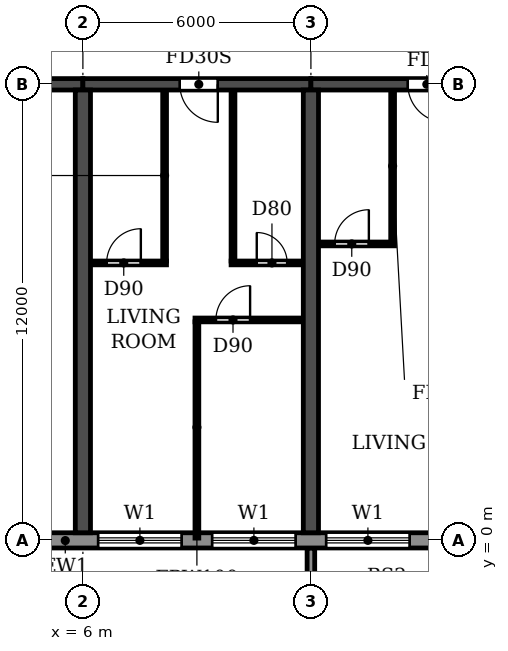
"""IFC4 building model, lengths in metres.
Left out: names, types, materials, properties, quantities, classifications, styles, units other than length and angle.
Written with IfcOpenShell. Run it as: python <this file> out.ifc"""

import sys

from ifc_helpers import new_model, si_unit, direction, frame, frame_2d, origin, place, context, subcontext, project, spatial, polyline, rectangle, outline, extrude, source, transform, mapped, element, fill, save


model = new_model("IFC4")
c1 = context("Model", 3, precision=1e-05, world=origin(), true_north=direction((0.0, 1.0)))
c2 = subcontext(c1, "Body", "Model", "MODEL_VIEW")
j1 = project(units=[si_unit("LENGTHUNIT", "METRE"), si_unit("PLANEANGLEUNIT", "RADIAN")], contexts=[c1])
p1 = place(None, origin())
s1 = spatial("IfcSite", under=j1, at=p1, CompositionType="ELEMENT")
p2 = place(p1, origin())
s2 = spatial("IfcBuilding", under=s1, at=p2, CompositionType="ELEMENT")
p3 = place(p2, frame((0.0, 0.0, 43.2)))
s3 = spatial("IfcBuildingStorey", under=s2, at=p3, CompositionType="ELEMENT", Elevation=43.2)
for number, where, z_axis, x_axis in (
    (1, (6.0, 0.2, 0.0), (0.0, 0.0, 1.0), (0.0, 1.0, 0.0)),
    (2, (12.0, 0.2, 0.0), (0.0, 0.0, 1.0), (0.0, 1.0, 0.0)),
):
    element("IfcWall", number, at=place(p3, frame(where, z_axis=z_axis, x_axis=x_axis)), inside=s3, PredefinedType="SHEAR", context=c2, shape_type="SweptSolid", body=[
        extrude(rectangle(XDim=11.65, YDim=0.4, at=frame_2d((5.825, 0.0))), origin(), (0.0, 0.0, 1.0), 3.05),
    ])
p4 = place(p3, frame((0.2, 12.0, 0.0), z_axis=(0.0, 0.0, 1.0), x_axis=(1.0, 0.0, 0.0)))
e3 = element("IfcWall", 3, at=p4, inside=s3, PredefinedType="SHEAR", context=c2, shape_type="SweptSolid", body=[
    extrude(rectangle(XDim=5.8, YDim=0.3, at=frame_2d((2.9, 0.0))), origin(), (0.0, 0.0, 1.0), 2.45),
])
p5 = place(p4, frame((2.3, 0.0, 0.0)))
e4 = element("IfcOpeningElement", 4, at=p5, cuts=e3, PredefinedType="OPENING", context=c2, shape_type="SweptSolid", body=[
    extrude(rectangle(XDim=1.0, YDim=2.1, at=frame_2d((0.5, 1.05))), frame((0.0, 0.16, 0.0), z_axis=(0.0, -1.0, 0.0), x_axis=(1.0, 0.0, 0.0)), (0.0, 0.0, 1.0), 0.32),
])
p6 = place(p3, frame((6.0, 12.0, 0.0), z_axis=(0.0, 0.0, 1.0), x_axis=(1.0, 0.0, 0.0)))
e5 = element("IfcWall", 5, at=p6, inside=s3, PredefinedType="SHEAR", context=c2, shape_type="SweptSolid", body=[
    extrude(rectangle(XDim=6.0, YDim=0.3, at=frame_2d((3.0, 0.0))), origin(), (0.0, 0.0, 1.0), 2.45),
])
p7 = place(p6, frame((2.55, 0.0, 0.0)))
e6 = element("IfcOpeningElement", 6, at=p7, cuts=e5, PredefinedType="OPENING", context=c2, shape_type="SweptSolid", body=[
    extrude(rectangle(XDim=1.0, YDim=2.1, at=frame_2d((0.5, 1.05))), frame((0.0, 0.16, 0.0), z_axis=(0.0, -1.0, 0.0), x_axis=(1.0, 0.0, 0.0)), (0.0, 0.0, 1.0), 0.32),
])
p8 = place(p3, frame((12.0, 12.0, 0.0), z_axis=(0.0, 0.0, 1.0), x_axis=(1.0, 0.0, 0.0)))
e7 = element("IfcWall", 7, at=p8, inside=s3, PredefinedType="SHEAR", context=c2, shape_type="SweptSolid", body=[
    extrude(rectangle(XDim=6.0, YDim=0.3, at=frame_2d((3.0, 0.0))), origin(), (0.0, 0.0, 1.0), 2.45),
])
p9 = place(p8, frame((2.55, 0.0, 0.0)))
e8 = element("IfcOpeningElement", 8, at=p9, cuts=e7, PredefinedType="OPENING", context=c2, shape_type="SweptSolid", body=[
    extrude(rectangle(XDim=1.0, YDim=2.1, at=frame_2d((0.5, 1.05))), frame((0.0, 0.16, 0.0), z_axis=(0.0, -1.0, 0.0), x_axis=(1.0, 0.0, 0.0)), (0.0, 0.0, 1.0), 0.32),
])
p10 = place(p3, frame((4.683, 0.0, 0.0), z_axis=(0.0, 0.0, 1.0), x_axis=(1.0, 0.0, 0.0)))
e9 = element("IfcWall", 9, at=p10, inside=s3, PredefinedType="STANDARD", context=c2, shape_type="SweptSolid", body=[
    extrude(rectangle(XDim=92.634, YDim=0.4, at=frame_2d((46.317, 0.0))), origin(), (0.0, 0.0, 1.0), 3.05),
])
p11 = place(p10, frame((1.717, 0.0, 0.9)))
e10 = element("IfcOpeningElement", 10, at=p11, cuts=e9, PredefinedType="OPENING", context=c2, shape_type="SweptSolid", body=[
    extrude(rectangle(XDim=2.2, YDim=1.5, at=frame_2d((1.1, 0.75))), frame((0.0, 0.21, 0.0), z_axis=(0.0, -1.0, 0.0), x_axis=(1.0, 0.0, 0.0)), (0.0, 0.0, 1.0), 0.42),
])
p12 = place(p10, frame((4.717, 0.0, 0.9)))
e11 = element("IfcOpeningElement", 11, at=p12, cuts=e9, PredefinedType="OPENING", context=c2, shape_type="SweptSolid", body=[
    extrude(rectangle(XDim=2.2, YDim=1.5, at=frame_2d((1.1, 0.75))), frame((0.0, 0.21, 0.0), z_axis=(0.0, -1.0, 0.0), x_axis=(1.0, 0.0, 0.0)), (0.0, 0.0, 1.0), 0.42),
])
p13 = place(p10, frame((7.717, 0.0, 0.9)))
e12 = element("IfcOpeningElement", 12, at=p13, cuts=e9, PredefinedType="OPENING", context=c2, shape_type="SweptSolid", body=[
    extrude(rectangle(XDim=2.2, YDim=1.5, at=frame_2d((1.1, 0.75))), frame((0.0, 0.21, 0.0), z_axis=(0.0, -1.0, 0.0), x_axis=(1.0, 0.0, 0.0)), (0.0, 0.0, 1.0), 0.42),
])
p14 = place(p10, frame((10.917, 0.0, 0.0)))
e13 = element("IfcOpeningElement", 13, at=p14, cuts=e9, PredefinedType="OPENING", context=c2, shape_type="SweptSolid", body=[
    extrude(rectangle(XDim=1.8, YDim=2.4, at=frame_2d((0.9, 1.2))), frame((0.0, 0.21, 0.0), z_axis=(0.0, -1.0, 0.0), x_axis=(1.0, 0.0, 0.0)), (0.0, 0.0, 1.0), 0.42),
])
p15 = place(p10, frame((13.717, 0.0, 0.9)))
e14 = element("IfcOpeningElement", 14, at=p15, cuts=e9, PredefinedType="OPENING", context=c2, shape_type="SweptSolid", body=[
    extrude(rectangle(XDim=2.2, YDim=1.5, at=frame_2d((1.1, 0.75))), frame((0.0, 0.21, 0.0), z_axis=(0.0, -1.0, 0.0), x_axis=(1.0, 0.0, 0.0)), (0.0, 0.0, 1.0), 0.42),
])
p16 = place(p10, frame((16.717, 0.0, 0.9)))
e15 = element("IfcOpeningElement", 15, at=p16, cuts=e9, PredefinedType="OPENING", context=c2, shape_type="SweptSolid", body=[
    extrude(rectangle(XDim=2.2, YDim=1.5, at=frame_2d((1.1, 0.75))), frame((0.0, 0.21, 0.0), z_axis=(0.0, -1.0, 0.0), x_axis=(1.0, 0.0, 0.0)), (0.0, 0.0, 1.0), 0.42),
])
p17 = place(p10, frame((19.917, 0.0, 0.0)))
e16 = element("IfcOpeningElement", 16, at=p17, cuts=e9, PredefinedType="OPENING", context=c2, shape_type="SweptSolid", body=[
    extrude(rectangle(XDim=1.8, YDim=2.4, at=frame_2d((0.9, 1.2))), frame((0.0, 0.21, 0.0), z_axis=(0.0, -1.0, 0.0), x_axis=(1.0, 0.0, 0.0)), (0.0, 0.0, 1.0), 0.42),
])
p18 = place(p10, frame((22.717, 0.0, 0.9)))
e17 = element("IfcOpeningElement", 17, at=p18, cuts=e9, PredefinedType="OPENING", context=c2, shape_type="SweptSolid", body=[
    extrude(rectangle(XDim=2.2, YDim=1.5, at=frame_2d((1.1, 0.75))), frame((0.0, 0.21, 0.0), z_axis=(0.0, -1.0, 0.0), x_axis=(1.0, 0.0, 0.0)), (0.0, 0.0, 1.0), 0.42),
])
p19 = place(p10, frame((25.717, 0.0, 0.9)))
e18 = element("IfcOpeningElement", 18, at=p19, cuts=e9, PredefinedType="OPENING", context=c2, shape_type="SweptSolid", body=[
    extrude(rectangle(XDim=2.2, YDim=1.5, at=frame_2d((1.1, 0.75))), frame((0.0, 0.21, 0.0), z_axis=(0.0, -1.0, 0.0), x_axis=(1.0, 0.0, 0.0)), (0.0, 0.0, 1.0), 0.42),
])
p20 = place(p10, frame((28.717, 0.0, 0.9)))
e19 = element("IfcOpeningElement", 19, at=p20, cuts=e9, PredefinedType="OPENING", context=c2, shape_type="SweptSolid", body=[
    extrude(rectangle(XDim=2.2, YDim=1.5, at=frame_2d((1.1, 0.75))), frame((0.0, 0.21, 0.0), z_axis=(0.0, -1.0, 0.0), x_axis=(1.0, 0.0, 0.0)), (0.0, 0.0, 1.0), 0.42),
])
p21 = place(p10, frame((31.717, 0.0, 0.9)))
e20 = element("IfcOpeningElement", 20, at=p21, cuts=e9, PredefinedType="OPENING", context=c2, shape_type="SweptSolid", body=[
    extrude(rectangle(XDim=2.2, YDim=1.5, at=frame_2d((1.1, 0.75))), frame((0.0, 0.21, 0.0), z_axis=(0.0, -1.0, 0.0), x_axis=(1.0, 0.0, 0.0)), (0.0, 0.0, 1.0), 0.42),
])
p22 = place(p10, frame((34.917, 0.0, 0.0)))
e21 = element("IfcOpeningElement", 21, at=p22, cuts=e9, PredefinedType="OPENING", context=c2, shape_type="SweptSolid", body=[
    extrude(rectangle(XDim=1.8, YDim=2.4, at=frame_2d((0.9, 1.2))), frame((0.0, 0.21, 0.0), z_axis=(0.0, -1.0, 0.0), x_axis=(1.0, 0.0, 0.0)), (0.0, 0.0, 1.0), 0.42),
])
p23 = place(p10, frame((37.717, 0.0, 0.9)))
e22 = element("IfcOpeningElement", 22, at=p23, cuts=e9, PredefinedType="OPENING", context=c2, shape_type="SweptSolid", body=[
    extrude(rectangle(XDim=2.2, YDim=1.5, at=frame_2d((1.1, 0.75))), frame((0.0, 0.21, 0.0), z_axis=(0.0, -1.0, 0.0), x_axis=(1.0, 0.0, 0.0)), (0.0, 0.0, 1.0), 0.42),
])
p24 = place(p10, frame((40.717, 0.0, 0.9)))
e23 = element("IfcOpeningElement", 23, at=p24, cuts=e9, PredefinedType="OPENING", context=c2, shape_type="SweptSolid", body=[
    extrude(rectangle(XDim=2.2, YDim=1.5, at=frame_2d((1.1, 0.75))), frame((0.0, 0.21, 0.0), z_axis=(0.0, -1.0, 0.0), x_axis=(1.0, 0.0, 0.0)), (0.0, 0.0, 1.0), 0.42),
])
p25 = place(p10, frame((43.717, 0.0, 0.9)))
e24 = element("IfcOpeningElement", 24, at=p25, cuts=e9, PredefinedType="OPENING", context=c2, shape_type="SweptSolid", body=[
    extrude(rectangle(XDim=2.2, YDim=1.5, at=frame_2d((1.1, 0.75))), frame((0.0, 0.21, 0.0), z_axis=(0.0, -1.0, 0.0), x_axis=(1.0, 0.0, 0.0)), (0.0, 0.0, 1.0), 0.42),
])
p26 = place(p10, frame((46.917, 0.0, 0.0)))
e25 = element("IfcOpeningElement", 25, at=p26, cuts=e9, PredefinedType="OPENING", context=c2, shape_type="SweptSolid", body=[
    extrude(rectangle(XDim=1.8, YDim=2.4, at=frame_2d((0.9, 1.2))), frame((0.0, 0.21, 0.0), z_axis=(0.0, -1.0, 0.0), x_axis=(1.0, 0.0, 0.0)), (0.0, 0.0, 1.0), 0.42),
])
p27 = place(p10, frame((49.717, 0.0, 0.9)))
e26 = element("IfcOpeningElement", 26, at=p27, cuts=e9, PredefinedType="OPENING", context=c2, shape_type="SweptSolid", body=[
    extrude(rectangle(XDim=2.2, YDim=1.5, at=frame_2d((1.1, 0.75))), frame((0.0, 0.21, 0.0), z_axis=(0.0, -1.0, 0.0), x_axis=(1.0, 0.0, 0.0)), (0.0, 0.0, 1.0), 0.42),
])
p28 = place(p10, frame((52.717, 0.0, 0.9)))
e27 = element("IfcOpeningElement", 27, at=p28, cuts=e9, PredefinedType="OPENING", context=c2, shape_type="SweptSolid", body=[
    extrude(rectangle(XDim=2.2, YDim=1.5, at=frame_2d((1.1, 0.75))), frame((0.0, 0.21, 0.0), z_axis=(0.0, -1.0, 0.0), x_axis=(1.0, 0.0, 0.0)), (0.0, 0.0, 1.0), 0.42),
])
p29 = place(p10, frame((55.717, 0.0, 0.9)))
e28 = element("IfcOpeningElement", 28, at=p29, cuts=e9, PredefinedType="OPENING", context=c2, shape_type="SweptSolid", body=[
    extrude(rectangle(XDim=2.2, YDim=1.5, at=frame_2d((1.1, 0.75))), frame((0.0, 0.21, 0.0), z_axis=(0.0, -1.0, 0.0), x_axis=(1.0, 0.0, 0.0)), (0.0, 0.0, 1.0), 0.42),
])
p30 = place(p10, frame((58.917, 0.0, 0.0)))
e29 = element("IfcOpeningElement", 29, at=p30, cuts=e9, PredefinedType="OPENING", context=c2, shape_type="SweptSolid", body=[
    extrude(rectangle(XDim=1.8, YDim=2.4, at=frame_2d((0.9, 1.2))), frame((0.0, 0.21, 0.0), z_axis=(0.0, -1.0, 0.0), x_axis=(1.0, 0.0, 0.0)), (0.0, 0.0, 1.0), 0.42),
])
p31 = place(p10, frame((61.717, 0.0, 0.9)))
e30 = element("IfcOpeningElement", 30, at=p31, cuts=e9, PredefinedType="OPENING", context=c2, shape_type="SweptSolid", body=[
    extrude(rectangle(XDim=2.2, YDim=1.5, at=frame_2d((1.1, 0.75))), frame((0.0, 0.21, 0.0), z_axis=(0.0, -1.0, 0.0), x_axis=(1.0, 0.0, 0.0)), (0.0, 0.0, 1.0), 0.42),
])
p32 = place(p10, frame((64.717, 0.0, 0.9)))
e31 = element("IfcOpeningElement", 31, at=p32, cuts=e9, PredefinedType="OPENING", context=c2, shape_type="SweptSolid", body=[
    extrude(rectangle(XDim=2.2, YDim=1.5, at=frame_2d((1.1, 0.75))), frame((0.0, 0.21, 0.0), z_axis=(0.0, -1.0, 0.0), x_axis=(1.0, 0.0, 0.0)), (0.0, 0.0, 1.0), 0.42),
])
p33 = place(p10, frame((67.717, 0.0, 0.9)))
e32 = element("IfcOpeningElement", 32, at=p33, cuts=e9, PredefinedType="OPENING", context=c2, shape_type="SweptSolid", body=[
    extrude(rectangle(XDim=2.2, YDim=1.5, at=frame_2d((1.1, 0.75))), frame((0.0, 0.21, 0.0), z_axis=(0.0, -1.0, 0.0), x_axis=(1.0, 0.0, 0.0)), (0.0, 0.0, 1.0), 0.42),
])
p34 = place(p10, frame((70.917, 0.0, 0.0)))
e33 = element("IfcOpeningElement", 33, at=p34, cuts=e9, PredefinedType="OPENING", context=c2, shape_type="SweptSolid", body=[
    extrude(rectangle(XDim=1.8, YDim=2.4, at=frame_2d((0.9, 1.2))), frame((0.0, 0.21, 0.0), z_axis=(0.0, -1.0, 0.0), x_axis=(1.0, 0.0, 0.0)), (0.0, 0.0, 1.0), 0.42),
])
p35 = place(p10, frame((73.717, 0.0, 0.9)))
e34 = element("IfcOpeningElement", 34, at=p35, cuts=e9, PredefinedType="OPENING", context=c2, shape_type="SweptSolid", body=[
    extrude(rectangle(XDim=2.2, YDim=1.5, at=frame_2d((1.1, 0.75))), frame((0.0, 0.21, 0.0), z_axis=(0.0, -1.0, 0.0), x_axis=(1.0, 0.0, 0.0)), (0.0, 0.0, 1.0), 0.42),
])
p36 = place(p10, frame((76.717, 0.0, 0.9)))
e35 = element("IfcOpeningElement", 35, at=p36, cuts=e9, PredefinedType="OPENING", context=c2, shape_type="SweptSolid", body=[
    extrude(rectangle(XDim=2.2, YDim=1.5, at=frame_2d((1.1, 0.75))), frame((0.0, 0.21, 0.0), z_axis=(0.0, -1.0, 0.0), x_axis=(1.0, 0.0, 0.0)), (0.0, 0.0, 1.0), 0.42),
])
p37 = place(p10, frame((79.717, 0.0, 0.9)))
e36 = element("IfcOpeningElement", 36, at=p37, cuts=e9, PredefinedType="OPENING", context=c2, shape_type="SweptSolid", body=[
    extrude(rectangle(XDim=2.2, YDim=1.5, at=frame_2d((1.1, 0.75))), frame((0.0, 0.21, 0.0), z_axis=(0.0, -1.0, 0.0), x_axis=(1.0, 0.0, 0.0)), (0.0, 0.0, 1.0), 0.42),
])
p38 = place(p10, frame((82.917, 0.0, 0.0)))
e37 = element("IfcOpeningElement", 37, at=p38, cuts=e9, PredefinedType="OPENING", context=c2, shape_type="SweptSolid", body=[
    extrude(rectangle(XDim=1.8, YDim=2.4, at=frame_2d((0.9, 1.2))), frame((0.0, 0.21, 0.0), z_axis=(0.0, -1.0, 0.0), x_axis=(1.0, 0.0, 0.0)), (0.0, 0.0, 1.0), 0.42),
])
p39 = place(p10, frame((85.717, 0.0, 0.9)))
e38 = element("IfcOpeningElement", 38, at=p39, cuts=e9, PredefinedType="OPENING", context=c2, shape_type="SweptSolid", body=[
    extrude(rectangle(XDim=2.2, YDim=1.5, at=frame_2d((1.1, 0.75))), frame((0.0, 0.21, 0.0), z_axis=(0.0, -1.0, 0.0), x_axis=(1.0, 0.0, 0.0)), (0.0, 0.0, 1.0), 0.42),
])
p40 = place(p10, frame((88.717, 0.0, 0.9)))
e39 = element("IfcOpeningElement", 39, at=p40, cuts=e9, PredefinedType="OPENING", context=c2, shape_type="SweptSolid", body=[
    extrude(rectangle(XDim=2.2, YDim=1.5, at=frame_2d((1.1, 0.75))), frame((0.0, 0.21, 0.0), z_axis=(0.0, -1.0, 0.0), x_axis=(1.0, 0.0, 0.0)), (0.0, 0.0, 1.0), 0.42),
])
m1 = source(origin(), c2, "Body", "SweptSolid", [
    extrude(outline(polyline([(0.0, 0.0), (0.2, 0.0), (0.2, 1.65), (0.0, 1.65), (0.0, 0.0)])), origin(), (0.0, 0.0, 1.0), 3.1),
])
p41 = place(p3, frame((11.9, -1.85, 0.0)))
e40 = element("IfcWall", 40, at=p41, inside=s3, PredefinedType="STANDARD", context=c2, shape_type="MappedRepresentation", body=[
    mapped(m1, transform((0.0, 0.0, 0.0))),
])
p42 = place(p3, frame((8.95, 5.8, 0.0), z_axis=(0.0, 0.0, 1.0), x_axis=(1.0, 0.0, 0.0)))
e41 = element("IfcWall", 41, at=p42, inside=s3, PredefinedType="PARTITIONING", context=c2, shape_type="SweptSolid", body=[
    extrude(rectangle(XDim=2.84, YDim=0.1, at=frame_2d((1.42, 0.0))), origin(), (0.0, 0.0, 1.0), 3.05),
])
p43 = place(p42, frame((0.55, 0.0, 0.0)))
e42 = element("IfcOpeningElement", 42, at=p43, cuts=e41, PredefinedType="OPENING", context=c2, shape_type="SweptSolid", body=[
    extrude(rectangle(XDim=0.9, YDim=2.1, at=frame_2d((0.45, 1.05))), frame((0.0, 0.06, 0.0), z_axis=(0.0, -1.0, 0.0), x_axis=(1.0, 0.0, 0.0)), (0.0, 0.0, 1.0), 0.12),
])
p44 = place(p3, frame((6.21, 7.3, 0.0), z_axis=(0.0, 0.0, 1.0), x_axis=(1.0, 0.0, 0.0)))
e43 = element("IfcWall", 43, at=p44, inside=s3, PredefinedType="PARTITIONING", context=c2, shape_type="SweptSolid", body=[
    extrude(rectangle(XDim=1.99, YDim=0.1, at=frame_2d((0.995, 0.0))), origin(), (0.0, 0.0, 1.0), 3.05),
])
p45 = place(p44, frame((0.415, 0.0, 0.0)))
e44 = element("IfcOpeningElement", 44, at=p45, cuts=e43, PredefinedType="OPENING", context=c2, shape_type="SweptSolid", body=[
    extrude(rectangle(XDim=0.9, YDim=2.1, at=frame_2d((0.45, 1.05))), frame((0.0, 0.06, 0.0), z_axis=(0.0, -1.0, 0.0), x_axis=(1.0, 0.0, 0.0)), (0.0, 0.0, 1.0), 0.12),
])
p46 = place(p3, frame((9.9, 7.3, 0.0), z_axis=(0.0, 0.0, 1.0), x_axis=(1.0, 0.0, 0.0)))
e45 = element("IfcWall", 45, at=p46, inside=s3, PredefinedType="PARTITIONING", context=c2, shape_type="SweptSolid", body=[
    extrude(rectangle(XDim=1.89, YDim=0.1, at=frame_2d((0.945, 0.0))), origin(), (0.0, 0.0, 1.0), 3.05),
])
p47 = place(p46, frame((0.675, 0.0, 0.0)))
e46 = element("IfcOpeningElement", 46, at=p47, cuts=e45, PredefinedType="OPENING", context=c2, shape_type="SweptSolid", body=[
    extrude(rectangle(XDim=0.8, YDim=2.1, at=frame_2d((0.4, 1.05))), frame((0.0, 0.06, 0.0), z_axis=(0.0, -1.0, 0.0), x_axis=(1.0, 0.0, 0.0)), (0.0, 0.0, 1.0), 0.12),
])
p48 = place(p3, frame((12.21, 7.8, 0.0), z_axis=(0.0, 0.0, 1.0), x_axis=(1.0, 0.0, 0.0)))
e47 = element("IfcWall", 47, at=p48, inside=s3, PredefinedType="PARTITIONING", context=c2, shape_type="SweptSolid", body=[
    extrude(rectangle(XDim=1.99, YDim=0.1, at=frame_2d((0.995, 0.0))), origin(), (0.0, 0.0, 1.0), 3.05),
])
p49 = place(p48, frame((0.415, 0.0, 0.0)))
e48 = element("IfcOpeningElement", 48, at=p49, cuts=e47, PredefinedType="OPENING", context=c2, shape_type="SweptSolid", body=[
    extrude(rectangle(XDim=0.9, YDim=2.1, at=frame_2d((0.45, 1.05))), frame((0.0, 0.06, 0.0), z_axis=(0.0, -1.0, 0.0), x_axis=(1.0, 0.0, 0.0)), (0.0, 0.0, 1.0), 0.12),
])
p50 = place(p3, frame((8.15, 7.35, 0.0), z_axis=(0.0, 0.0, 1.0), x_axis=(0.0, 1.0, 0.0)))
e49 = element("IfcWall", 49, at=p50, inside=s3, PredefinedType="PARTITIONING", context=c2, shape_type="SweptSolid", body=[
    extrude(rectangle(XDim=4.49, YDim=0.1, at=frame_2d((2.245, 0.0))), origin(), (0.0, 0.0, 1.0), 3.05),
])
p51 = place(p3, frame((9.0, 0.06, 0.0), z_axis=(0.0, 0.0, 1.0), x_axis=(0.0, 1.0, 0.0)))
e50 = element("IfcWall", 50, at=p51, inside=s3, PredefinedType="PARTITIONING", context=c2, shape_type="SweptSolid", body=[
    extrude(rectangle(XDim=5.69, YDim=0.1, at=frame_2d((2.845, 0.0))), origin(), (0.0, 0.0, 1.0), 3.05),
])
p52 = place(p3, frame((9.95, 7.35, 0.0), z_axis=(0.0, 0.0, 1.0), x_axis=(0.0, 1.0, 0.0)))
e51 = element("IfcWall", 51, at=p52, inside=s3, PredefinedType="PARTITIONING", context=c2, shape_type="SweptSolid", body=[
    extrude(rectangle(XDim=4.49, YDim=0.1, at=frame_2d((2.245, 0.0))), origin(), (0.0, 0.0, 1.0), 3.05),
])
p53 = place(p3, frame((14.15, 7.85, 0.0), z_axis=(0.0, 0.0, 1.0), x_axis=(0.0, 1.0, 0.0)))
e52 = element("IfcWall", 52, at=p53, inside=s3, PredefinedType="PARTITIONING", context=c2, shape_type="SweptSolid", body=[
    extrude(rectangle(XDim=3.99, YDim=0.1, at=frame_2d((1.995, 0.0))), origin(), (0.0, 0.0, 1.0), 3.05),
])
p54 = place(p11, origin())
e53 = element("IfcWindow", 53, at=p54, inside=s3, PartitioningType="DOUBLE_PANEL_HORIZONTAL", PredefinedType="WINDOW", context=c2, shape_type="SweptSolid", body=[
    extrude(rectangle(XDim=2.2, YDim=1.5, at=frame_2d((1.1, 0.75))), frame((0.0, 0.03, 0.0), z_axis=(0.0, -1.0, 0.0), x_axis=(1.0, 0.0, 0.0)), (0.0, 0.0, 1.0), 0.06),
])
fill(e10, e53)
p55 = place(p12, origin())
e54 = element("IfcWindow", 54, at=p55, inside=s3, PartitioningType="DOUBLE_PANEL_HORIZONTAL", PredefinedType="WINDOW", context=c2, shape_type="SweptSolid", body=[
    extrude(rectangle(XDim=2.2, YDim=1.5, at=frame_2d((1.1, 0.75))), frame((0.0, 0.03, 0.0), z_axis=(0.0, -1.0, 0.0), x_axis=(1.0, 0.0, 0.0)), (0.0, 0.0, 1.0), 0.06),
])
fill(e11, e54)
p56 = place(p13, origin())
e55 = element("IfcWindow", 55, at=p56, inside=s3, PartitioningType="DOUBLE_PANEL_HORIZONTAL", PredefinedType="WINDOW", context=c2, shape_type="SweptSolid", body=[
    extrude(rectangle(XDim=2.2, YDim=1.5, at=frame_2d((1.1, 0.75))), frame((0.0, 0.03, 0.0), z_axis=(0.0, -1.0, 0.0), x_axis=(1.0, 0.0, 0.0)), (0.0, 0.0, 1.0), 0.06),
])
fill(e12, e55)
p57 = place(p45, origin())
e56 = element("IfcDoor", 56, at=p57, inside=s3, OperationType="SINGLE_SWING_RIGHT", PredefinedType="DOOR", context=c2, shape_type="SweptSolid", body=[
    extrude(rectangle(XDim=0.9, YDim=2.1, at=frame_2d((0.45, 1.05))), frame((0.0, 0.025, 0.0), z_axis=(0.0, -1.0, 0.0), x_axis=(1.0, 0.0, 0.0)), (0.0, 0.0, 1.0), 0.05),
])
fill(e44, e56)
p58 = place(p7, frame((1.0, 0.0, 0.0), z_axis=(0.0, 0.0, 1.0), x_axis=(-1.0, 0.0, 0.0)))
e57 = element("IfcDoor", 57, at=p58, inside=s3, OperationType="SINGLE_SWING_LEFT", PredefinedType="DOOR", context=c2, shape_type="SweptSolid", body=[
    extrude(rectangle(XDim=1.0, YDim=2.1, at=frame_2d((0.5, 1.05))), frame((0.0, 0.025, 0.0), z_axis=(0.0, -1.0, 0.0), x_axis=(1.0, 0.0, 0.0)), (0.0, 0.0, 1.0), 0.05),
])
fill(e6, e57)
p59 = place(p43, origin())
e58 = element("IfcDoor", 58, at=p59, inside=s3, OperationType="SINGLE_SWING_RIGHT", PredefinedType="DOOR", context=c2, shape_type="SweptSolid", body=[
    extrude(rectangle(XDim=0.9, YDim=2.1, at=frame_2d((0.45, 1.05))), frame((0.0, 0.025, 0.0), z_axis=(0.0, -1.0, 0.0), x_axis=(1.0, 0.0, 0.0)), (0.0, 0.0, 1.0), 0.05),
])
fill(e42, e58)
p60 = place(p47, origin())
e59 = element("IfcDoor", 59, at=p60, inside=s3, OperationType="SINGLE_SWING_LEFT", PredefinedType="DOOR", context=c2, shape_type="SweptSolid", body=[
    extrude(rectangle(XDim=0.8, YDim=2.1, at=frame_2d((0.4, 1.05))), frame((0.0, 0.025, 0.0), z_axis=(0.0, -1.0, 0.0), x_axis=(1.0, 0.0, 0.0)), (0.0, 0.0, 1.0), 0.05),
])
fill(e46, e59)
p61 = place(p49, origin())
e60 = element("IfcDoor", 60, at=p61, inside=s3, OperationType="SINGLE_SWING_RIGHT", PredefinedType="DOOR", context=c2, shape_type="SweptSolid", body=[
    extrude(rectangle(XDim=0.9, YDim=2.1, at=frame_2d((0.45, 1.05))), frame((0.0, 0.025, 0.0), z_axis=(0.0, -1.0, 0.0), x_axis=(1.0, 0.0, 0.0)), (0.0, 0.0, 1.0), 0.05),
])
fill(e48, e60)
p62 = place(p9, frame((1.0, 0.0, 0.0), z_axis=(0.0, 0.0, 1.0), x_axis=(-1.0, 0.0, 0.0)))
e61 = element("IfcDoor", 61, at=p62, inside=s3, OperationType="SINGLE_SWING_LEFT", PredefinedType="DOOR", context=c2, shape_type="SweptSolid", body=[
    extrude(rectangle(XDim=1.0, YDim=2.1, at=frame_2d((0.5, 1.05))), frame((0.0, 0.025, 0.0), z_axis=(0.0, -1.0, 0.0), x_axis=(1.0, 0.0, 0.0)), (0.0, 0.0, 1.0), 0.05),
])
fill(e8, e61)
save(model, sys.argv[1])
